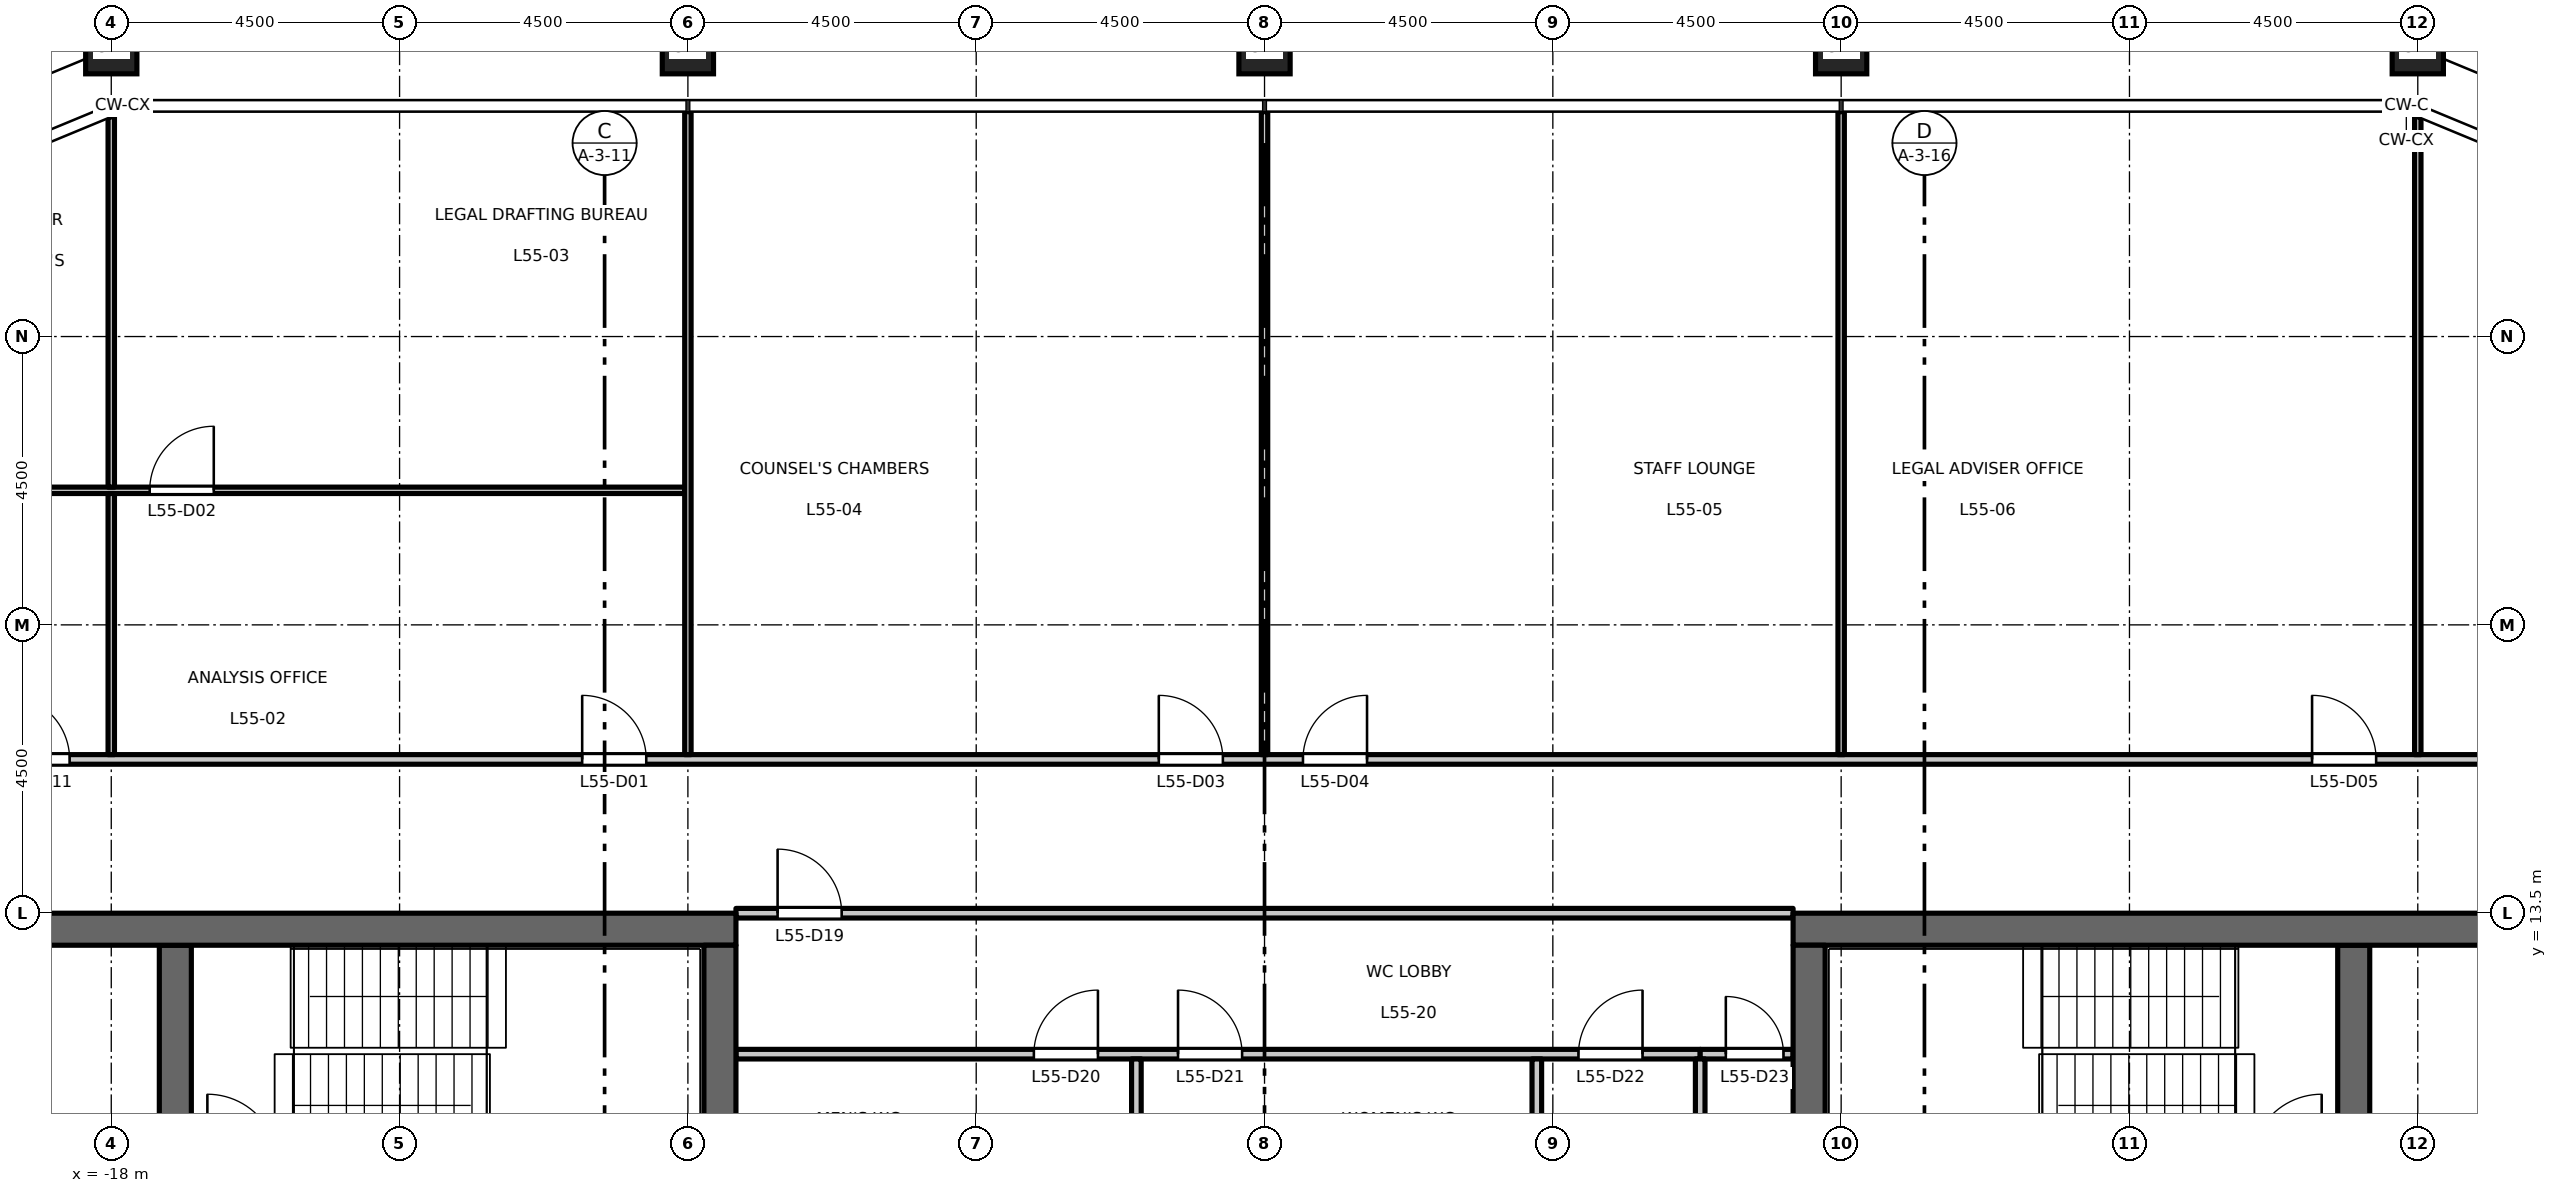
"""IFC4 building model, lengths in metres.
Left out: names, types, materials, properties, quantities, classifications, styles, units other than length and angle.
Written with IfcOpenShell. Run it as: python <this file> out.ifc"""

import sys

from ifc_helpers import new_model, si_unit, direction, frame, frame_2d, origin, origin_2d, place, context, subcontext, project, spatial, rectangle, hollow_rectangle, extrude, element, fill, save


model = new_model("IFC4")
c1 = context("Model", 3, precision=1e-05, world=origin(), true_north=direction((0.0, 1.0)))
c2 = subcontext(c1, "Body", "Model", "MODEL_VIEW")
j1 = project(units=[si_unit("LENGTHUNIT", "METRE"), si_unit("PLANEANGLEUNIT", "RADIAN")], contexts=[c1])
p1 = place(None, origin())
s1 = spatial("IfcSite", under=j1, at=p1, CompositionType="ELEMENT")
p2 = place(p1, origin())
s2 = spatial("IfcBuilding", under=s1, at=p2, CompositionType="ELEMENT")
p3 = place(p2, frame((0.0, 0.0, 255.7)))
s3 = spatial("IfcBuildingStorey", under=s2, at=p3, CompositionType="ELEMENT", Elevation=255.7)
for number, where, z_axis, x_axis in (
    (1, (18.0, 27.0, 0.0), (0.0, 0.0, 1.0), (1.0, 0.0, 0.0)),
    (2, (9.0, 27.0, 0.0), (0.0, 0.0, 1.0), (1.0, 0.0, 0.0)),
    (3, (0.0, 27.0, 0.0), (0.0, 0.0, 1.0), (1.0, 0.0, 0.0)),
    (4, (-9.0, 27.0, 0.0), (0.0, 0.0, 1.0), (1.0, 0.0, 0.0)),
    (5, (-18.0, 27.0, 0.0), (0.0, 0.0, 1.0), (1.0, 0.0, 0.0)),
):
    element("IfcColumn", number, at=place(p3, frame(where, z_axis=z_axis, x_axis=x_axis)), inside=s3, PredefinedType="COLUMN", context=c2, shape_type="SweptSolid", body=[
        extrude(hollow_rectangle(XDim=0.8, YDim=0.8, WallThickness=0.045, at=origin_2d()), origin(), (0.0, 0.0, 1.0), 4.5),
    ])
p4 = place(p3, frame((-17.0, 6.425, 0.0), z_axis=(0.0, 0.0, 1.0), x_axis=(0.0, 1.0, 0.0)))
e6 = element("IfcWall", 6, at=p4, inside=s3, PredefinedType="SHEAR", context=c2, shape_type="SweptSolid", body=[
    extrude(rectangle(XDim=6.575, YDim=0.5, at=frame_2d((3.288, 0.0))), origin(), (0.0, 0.0, 1.0), 4.35),
])
p5 = place(p3, frame((-8.25, 13.25, 0.0), z_axis=(0.0, 0.0, 1.0), x_axis=(-1.0, 0.0, 0.0)))
e7 = element("IfcWall", 7, at=p5, inside=s3, PredefinedType="SHEAR", context=c2, shape_type="SweptSolid", body=[
    extrude(rectangle(XDim=13.5, YDim=0.5, at=frame_2d((6.75, 0.0))), origin(), (0.0, 0.0, 1.0), 4.35),
])
p6 = place(p3, frame((-8.5, -13.0, 0.0), z_axis=(0.0, 0.0, 1.0), x_axis=(0.0, 1.0, 0.0)))
e8 = element("IfcWall", 8, at=p6, inside=s3, PredefinedType="SHEAR", context=c2, shape_type="SweptSolid", body=[
    extrude(rectangle(XDim=26.0, YDim=0.5, at=frame_2d((13.0, 0.0))), origin(), (0.0, 0.0, 1.0), 4.35),
])
p7 = place(p3, frame((17.0, 6.425, 0.0), z_axis=(0.0, 0.0, 1.0), x_axis=(0.0, 1.0, 0.0)))
e9 = element("IfcWall", 9, at=p7, inside=s3, PredefinedType="SHEAR", context=c2, shape_type="SweptSolid", body=[
    extrude(rectangle(XDim=6.575, YDim=0.5, at=frame_2d((3.288, 0.0))), origin(), (0.0, 0.0, 1.0), 4.35),
])
p8 = place(p3, frame((8.25, 13.25, 0.0), z_axis=(0.0, 0.0, 1.0), x_axis=(1.0, 0.0, 0.0)))
e10 = element("IfcWall", 10, at=p8, inside=s3, PredefinedType="SHEAR", context=c2, shape_type="SweptSolid", body=[
    extrude(rectangle(XDim=13.5, YDim=0.5, at=frame_2d((6.75, 0.0))), origin(), (0.0, 0.0, 1.0), 4.35),
])
p9 = place(p3, frame((8.5, -13.0, 0.0), z_axis=(0.0, 0.0, 1.0), x_axis=(0.0, 1.0, 0.0)))
e11 = element("IfcWall", 11, at=p9, inside=s3, PredefinedType="SHEAR", context=c2, shape_type="SweptSolid", body=[
    extrude(rectangle(XDim=26.0, YDim=0.5, at=frame_2d((13.0, 0.0))), origin(), (0.0, 0.0, 1.0), 4.35),
])
p10 = place(p3, frame((-8.25, 11.3, 0.0), z_axis=(0.0, 0.0, 1.0), x_axis=(1.0, 0.0, 0.0)))
e12 = element("IfcWall", 12, at=p10, inside=s3, PredefinedType="PARTITIONING", context=c2, shape_type="SweptSolid", body=[
    extrude(rectangle(XDim=15.05, YDim=0.15, at=frame_2d((7.525, 0.0))), origin(), (0.0, 0.0, 1.0), 4.35),
])
p11 = place(p10, frame((4.65, 0.0, 0.0)))
e13 = element("IfcOpeningElement", 13, at=p11, cuts=e12, PredefinedType="OPENING", context=c2, shape_type="SweptSolid", body=[
    extrude(rectangle(XDim=1.0, YDim=2.1, at=frame_2d((0.5, 1.05))), frame((0.0, 0.085, 0.0), z_axis=(0.0, -1.0, 0.0), x_axis=(1.0, 0.0, 0.0)), (0.0, 0.0, 1.0), 0.17),
])
p12 = place(p10, frame((6.9, 0.0, 0.0)))
e14 = element("IfcOpeningElement", 14, at=p12, cuts=e12, PredefinedType="OPENING", context=c2, shape_type="SweptSolid", body=[
    extrude(rectangle(XDim=1.0, YDim=2.1, at=frame_2d((0.5, 1.05))), frame((0.0, 0.085, 0.0), z_axis=(0.0, -1.0, 0.0), x_axis=(1.0, 0.0, 0.0)), (0.0, 0.0, 1.0), 0.17),
])
p13 = place(p10, frame((13.15, 0.0, 0.0)))
e15 = element("IfcOpeningElement", 15, at=p13, cuts=e12, PredefinedType="OPENING", context=c2, shape_type="SweptSolid", body=[
    extrude(rectangle(XDim=1.0, YDim=2.1, at=frame_2d((0.5, 1.05))), frame((0.0, 0.085, 0.0), z_axis=(0.0, -1.0, 0.0), x_axis=(1.0, 0.0, 0.0)), (0.0, 0.0, 1.0), 0.17),
])
p14 = place(p3, frame((6.8, 11.3, 0.0), z_axis=(0.0, 0.0, 1.0), x_axis=(1.0, 0.0, 0.0)))
e16 = element("IfcWall", 16, at=p14, inside=s3, PredefinedType="PARTITIONING", context=c2, shape_type="SweptSolid", body=[
    extrude(rectangle(XDim=1.45, YDim=0.15, at=frame_2d((0.725, 0.0))), origin(), (0.0, 0.0, 1.0), 4.35),
])
p15 = place(p14, frame((0.4, 0.0, 0.0)))
e17 = element("IfcOpeningElement", 17, at=p15, cuts=e16, PredefinedType="OPENING", context=c2, shape_type="SweptSolid", body=[
    extrude(rectangle(XDim=0.9, YDim=2.1, at=frame_2d((0.45, 1.05))), frame((0.0, 0.085, 0.0), z_axis=(0.0, -1.0, 0.0), x_axis=(1.0, 0.0, 0.0)), (0.0, 0.0, 1.0), 0.17),
])
p16 = place(p3, frame((-8.25, 13.5, 0.0), z_axis=(0.0, 0.0, 1.0), x_axis=(1.0, 0.0, 0.0)))
e18 = element("IfcWall", 18, at=p16, inside=s3, PredefinedType="PARTITIONING", context=c2, shape_type="SweptSolid", body=[
    extrude(rectangle(XDim=16.5, YDim=0.15, at=frame_2d((8.25, 0.0))), origin(), (0.0, 0.0, 1.0), 4.35),
])
p17 = place(p16, frame((0.65, 0.0, 0.0)))
e19 = element("IfcOpeningElement", 19, at=p17, cuts=e18, PredefinedType="OPENING", context=c2, shape_type="SweptSolid", body=[
    extrude(rectangle(XDim=1.0, YDim=2.1, at=frame_2d((0.5, 1.05))), frame((0.0, 0.085, 0.0), z_axis=(0.0, -1.0, 0.0), x_axis=(1.0, 0.0, 0.0)), (0.0, 0.0, 1.0), 0.17),
])
p18 = place(p3, frame((-26.01, 15.9, 0.0), z_axis=(0.0, 0.0, 1.0), x_axis=(1.0, 0.0, 0.0)))
e20 = element("IfcWall", 20, at=p18, inside=s3, PredefinedType="PARTITIONING", context=c2, shape_type="SweptSolid", body=[
    extrude(rectangle(XDim=52.02, YDim=0.15, at=frame_2d((26.01, 0.0))), origin(), (0.0, 0.0, 1.0), 4.35),
])
p19 = place(p18, frame((15.36, 0.0, 0.0)))
e21 = element("IfcOpeningElement", 21, at=p19, cuts=e20, PredefinedType="OPENING", context=c2, shape_type="SweptSolid", body=[
    extrude(rectangle(XDim=1.0, YDim=2.1, at=frame_2d((0.5, 1.05))), frame((0.0, 0.085, 0.0), z_axis=(0.0, -1.0, 0.0), x_axis=(1.0, 0.0, 0.0)), (0.0, 0.0, 1.0), 0.17),
])
p20 = place(p18, frame((24.36, 0.0, 0.0)))
e22 = element("IfcOpeningElement", 22, at=p20, cuts=e20, PredefinedType="OPENING", context=c2, shape_type="SweptSolid", body=[
    extrude(rectangle(XDim=1.0, YDim=2.1, at=frame_2d((0.5, 1.05))), frame((0.0, 0.085, 0.0), z_axis=(0.0, -1.0, 0.0), x_axis=(1.0, 0.0, 0.0)), (0.0, 0.0, 1.0), 0.17),
])
p21 = place(p18, frame((26.61, 0.0, 0.0)))
e23 = element("IfcOpeningElement", 23, at=p21, cuts=e20, PredefinedType="OPENING", context=c2, shape_type="SweptSolid", body=[
    extrude(rectangle(XDim=1.0, YDim=2.1, at=frame_2d((0.5, 1.05))), frame((0.0, 0.085, 0.0), z_axis=(0.0, -1.0, 0.0), x_axis=(1.0, 0.0, 0.0)), (0.0, 0.0, 1.0), 0.17),
])
p22 = place(p18, frame((42.36, 0.0, 0.0)))
e24 = element("IfcOpeningElement", 24, at=p22, cuts=e20, PredefinedType="OPENING", context=c2, shape_type="SweptSolid", body=[
    extrude(rectangle(XDim=1.0, YDim=2.1, at=frame_2d((0.5, 1.05))), frame((0.0, 0.085, 0.0), z_axis=(0.0, -1.0, 0.0), x_axis=(1.0, 0.0, 0.0)), (0.0, 0.0, 1.0), 0.17),
])
p23 = place(p18, frame((6.36, 0.0, 0.0)))
e25 = element("IfcOpeningElement", 25, at=p23, cuts=e20, PredefinedType="OPENING", context=c2, shape_type="SweptSolid", body=[
    extrude(rectangle(XDim=1.0, YDim=2.1, at=frame_2d((0.5, 1.05))), frame((0.0, 0.085, 0.0), z_axis=(0.0, -1.0, 0.0), x_axis=(1.0, 0.0, 0.0)), (0.0, 0.0, 1.0), 0.17),
])
p24 = place(p18, frame((50.37, 0.0, 0.0)))
e26 = element("IfcOpeningElement", 26, at=p24, cuts=e20, PredefinedType="OPENING", context=c2, shape_type="SweptSolid", body=[
    extrude(rectangle(XDim=1.0, YDim=2.1, at=frame_2d((0.5, 1.05))), frame((0.0, 0.085, 0.0), z_axis=(0.0, -1.0, 0.0), x_axis=(1.0, 0.0, 0.0)), (0.0, 0.0, 1.0), 0.17),
])
p25 = place(p3, frame((-25.058, 20.1, 0.0), z_axis=(0.0, 0.0, 1.0), x_axis=(1.0, 0.0, 0.0)))
e27 = element("IfcWall", 27, at=p25, inside=s3, PredefinedType="PARTITIONING", context=c2, shape_type="SweptSolid", body=[
    extrude(rectangle(XDim=16.008, YDim=0.1, at=frame_2d((8.004, 0.0))), origin(), (0.0, 0.0, 1.0), 4.35),
])
p26 = place(p25, frame((7.658, 0.0, 0.0)))
e28 = element("IfcOpeningElement", 28, at=p26, cuts=e27, PredefinedType="OPENING", context=c2, shape_type="SweptSolid", body=[
    extrude(rectangle(XDim=1.0, YDim=2.1, at=frame_2d((0.5, 1.05))), frame((0.0, 0.06, 0.0), z_axis=(0.0, -1.0, 0.0), x_axis=(1.0, 0.0, 0.0)), (0.0, 0.0, 1.0), 0.12),
])
p27 = place(p25, frame((0.658, 0.0, 0.0)))
e29 = element("IfcOpeningElement", 29, at=p27, cuts=e27, PredefinedType="OPENING", context=c2, shape_type="SweptSolid", body=[
    extrude(rectangle(XDim=1.0, YDim=2.1, at=frame_2d((0.5, 1.05))), frame((0.0, 0.06, 0.0), z_axis=(0.0, -1.0, 0.0), x_axis=(1.0, 0.0, 0.0)), (0.0, 0.0, 1.0), 0.12),
])
p28 = place(p3, frame((-18.0, 15.975, 0.0), z_axis=(0.0, 0.0, 1.0), x_axis=(0.0, 1.0, 0.0)))
e30 = element("IfcWall", 30, at=p28, inside=s3, PredefinedType="PARTITIONING", context=c2, shape_type="SweptSolid", body=[
    extrude(rectangle(XDim=4.075, YDim=0.1, at=frame_2d((2.038, 0.0))), origin(), (0.0, 0.0, 1.0), 3.65),
])
p29 = place(p3, frame((-18.0, 20.15, 0.0), z_axis=(0.0, 0.0, 1.0), x_axis=(0.0, 1.0, 0.0)))
e31 = element("IfcWall", 31, at=p29, inside=s3, PredefinedType="PARTITIONING", context=c2, shape_type="SweptSolid", body=[
    extrude(rectangle(XDim=5.778, YDim=0.1, at=frame_2d((2.889, 0.0))), origin(), (0.0, 0.0, 1.0), 3.65),
])
p30 = place(p3, frame((-9.0, 15.975, 0.0), z_axis=(0.0, 0.0, 1.0), x_axis=(0.0, 1.0, 0.0)))
e32 = element("IfcWall", 32, at=p30, inside=s3, PredefinedType="PARTITIONING", context=c2, shape_type="SweptSolid", body=[
    extrude(rectangle(XDim=10.035, YDim=0.1, at=frame_2d((5.018, 0.0))), origin(), (0.0, 0.0, 1.0), 3.65),
])
p31 = place(p3, frame((-2.0, 8.37, 0.0), z_axis=(0.0, 0.0, 1.0), x_axis=(0.0, 1.0, 0.0)))
e33 = element("IfcWall", 33, at=p31, inside=s3, PredefinedType="PARTITIONING", context=c2, shape_type="SweptSolid", body=[
    extrude(rectangle(XDim=2.855, YDim=0.15, at=frame_2d((1.427, 0.0))), origin(), (0.0, 0.0, 1.0), 4.35),
])
p32 = place(p3, frame((0.0, 15.975, 0.0), z_axis=(0.0, 0.0, 1.0), x_axis=(0.0, 1.0, 0.0)))
e34 = element("IfcWall", 34, at=p32, inside=s3, PredefinedType="PARTITIONING", context=c2, shape_type="SweptSolid", body=[
    extrude(rectangle(XDim=10.035, YDim=0.1, at=frame_2d((5.018, 0.0))), origin(), (0.0, 0.0, 1.0), 3.55),
])
p33 = place(p3, frame((4.25, 8.37, 0.0), z_axis=(0.0, 0.0, 1.0), x_axis=(0.0, 1.0, 0.0)))
e35 = element("IfcWall", 35, at=p33, inside=s3, PredefinedType="PARTITIONING", context=c2, shape_type="SweptSolid", body=[
    extrude(rectangle(XDim=2.855, YDim=0.15, at=frame_2d((1.427, 0.0))), origin(), (0.0, 0.0, 1.0), 4.35),
])
p34 = place(p3, frame((6.8, 8.069, 0.0), z_axis=(0.0, 0.0, 1.0), x_axis=(0.0, 1.0, 0.0)))
e36 = element("IfcWall", 36, at=p34, inside=s3, PredefinedType="PARTITIONING", context=c2, shape_type="SweptSolid", body=[
    extrude(rectangle(XDim=3.156, YDim=0.15, at=frame_2d((1.578, 0.0))), origin(), (0.0, 0.0, 1.0), 4.35),
])
p35 = place(p3, frame((9.0, 15.975, 0.0), z_axis=(0.0, 0.0, 1.0), x_axis=(0.0, 1.0, 0.0)))
e37 = element("IfcWall", 37, at=p35, inside=s3, PredefinedType="PARTITIONING", context=c2, shape_type="SweptSolid", body=[
    extrude(rectangle(XDim=10.035, YDim=0.1, at=frame_2d((5.018, 0.0))), origin(), (0.0, 0.0, 1.0), 3.65),
])
p36 = place(p3, frame((18.0, 15.975, 0.0), z_axis=(0.0, 0.0, 1.0), x_axis=(0.0, 1.0, 0.0)))
e38 = element("IfcWall", 38, at=p36, inside=s3, PredefinedType="PARTITIONING", context=c2, shape_type="SweptSolid", body=[
    extrude(rectangle(XDim=9.953, YDim=0.1, at=frame_2d((4.977, 0.0))), origin(), (0.0, 0.0, 1.0), 3.65),
])
p37 = place(p19, origin())
e39 = element("IfcDoor", 39, at=p37, inside=s3, OperationType="SINGLE_SWING_LEFT", PredefinedType="DOOR", context=c2, shape_type="SweptSolid", body=[
    extrude(rectangle(XDim=1.0, YDim=2.1, at=frame_2d((0.5, 1.05))), frame((0.0, 0.025, 0.0), z_axis=(0.0, -1.0, 0.0), x_axis=(1.0, 0.0, 0.0)), (0.0, 0.0, 1.0), 0.05),
])
fill(e21, e39)
p38 = place(p26, origin())
e40 = element("IfcDoor", 40, at=p38, inside=s3, OperationType="SINGLE_SWING_RIGHT", PredefinedType="DOOR", context=c2, shape_type="SweptSolid", body=[
    extrude(rectangle(XDim=1.0, YDim=2.1, at=frame_2d((0.5, 1.05))), frame((0.0, 0.025, 0.0), z_axis=(0.0, -1.0, 0.0), x_axis=(1.0, 0.0, 0.0)), (0.0, 0.0, 1.0), 0.05),
])
fill(e28, e40)
p39 = place(p20, origin())
e41 = element("IfcDoor", 41, at=p39, inside=s3, OperationType="SINGLE_SWING_LEFT", PredefinedType="DOOR", context=c2, shape_type="SweptSolid", body=[
    extrude(rectangle(XDim=1.0, YDim=2.1, at=frame_2d((0.5, 1.05))), frame((0.0, 0.025, 0.0), z_axis=(0.0, -1.0, 0.0), x_axis=(1.0, 0.0, 0.0)), (0.0, 0.0, 1.0), 0.05),
])
fill(e22, e41)
p40 = place(p21, origin())
e42 = element("IfcDoor", 42, at=p40, inside=s3, OperationType="SINGLE_SWING_RIGHT", PredefinedType="DOOR", context=c2, shape_type="SweptSolid", body=[
    extrude(rectangle(XDim=1.0, YDim=2.1, at=frame_2d((0.5, 1.05))), frame((0.0, 0.025, 0.0), z_axis=(0.0, -1.0, 0.0), x_axis=(1.0, 0.0, 0.0)), (0.0, 0.0, 1.0), 0.05),
])
fill(e23, e42)
p41 = place(p22, origin())
e43 = element("IfcDoor", 43, at=p41, inside=s3, OperationType="SINGLE_SWING_LEFT", PredefinedType="DOOR", context=c2, shape_type="SweptSolid", body=[
    extrude(rectangle(XDim=1.0, YDim=2.1, at=frame_2d((0.5, 1.05))), frame((0.0, 0.025, 0.0), z_axis=(0.0, -1.0, 0.0), x_axis=(1.0, 0.0, 0.0)), (0.0, 0.0, 1.0), 0.05),
])
fill(e24, e43)
p42 = place(p23, origin())
e44 = element("IfcDoor", 44, at=p42, inside=s3, OperationType="SINGLE_SWING_LEFT", PredefinedType="DOOR", context=c2, shape_type="SweptSolid", body=[
    extrude(rectangle(XDim=1.0, YDim=2.1, at=frame_2d((0.5, 1.05))), frame((0.0, 0.025, 0.0), z_axis=(0.0, -1.0, 0.0), x_axis=(1.0, 0.0, 0.0)), (0.0, 0.0, 1.0), 0.05),
])
fill(e25, e44)
p43 = place(p17, origin())
e45 = element("IfcDoor", 45, at=p43, inside=s3, OperationType="SINGLE_SWING_LEFT", PredefinedType="DOOR", context=c2, shape_type="SweptSolid", body=[
    extrude(rectangle(XDim=1.0, YDim=2.1, at=frame_2d((0.5, 1.05))), frame((0.0, 0.025, 0.0), z_axis=(0.0, -1.0, 0.0), x_axis=(1.0, 0.0, 0.0)), (0.0, 0.0, 1.0), 0.05),
])
fill(e19, e45)
p44 = place(p11, origin())
e46 = element("IfcDoor", 46, at=p44, inside=s3, OperationType="SINGLE_SWING_RIGHT", PredefinedType="DOOR", context=c2, shape_type="SweptSolid", body=[
    extrude(rectangle(XDim=1.0, YDim=2.1, at=frame_2d((0.5, 1.05))), frame((0.0, 0.025, 0.0), z_axis=(0.0, -1.0, 0.0), x_axis=(1.0, 0.0, 0.0)), (0.0, 0.0, 1.0), 0.05),
])
fill(e13, e46)
p45 = place(p12, origin())
e47 = element("IfcDoor", 47, at=p45, inside=s3, OperationType="SINGLE_SWING_LEFT", PredefinedType="DOOR", context=c2, shape_type="SweptSolid", body=[
    extrude(rectangle(XDim=1.0, YDim=2.1, at=frame_2d((0.5, 1.05))), frame((0.0, 0.025, 0.0), z_axis=(0.0, -1.0, 0.0), x_axis=(1.0, 0.0, 0.0)), (0.0, 0.0, 1.0), 0.05),
])
fill(e14, e47)
p46 = place(p13, origin())
e48 = element("IfcDoor", 48, at=p46, inside=s3, OperationType="SINGLE_SWING_RIGHT", PredefinedType="DOOR", context=c2, shape_type="SweptSolid", body=[
    extrude(rectangle(XDim=1.0, YDim=2.1, at=frame_2d((0.5, 1.05))), frame((0.0, 0.025, 0.0), z_axis=(0.0, -1.0, 0.0), x_axis=(1.0, 0.0, 0.0)), (0.0, 0.0, 1.0), 0.05),
])
fill(e15, e48)
p47 = place(p15, origin())
e49 = element("IfcDoor", 49, at=p47, inside=s3, OperationType="SINGLE_SWING_LEFT", PredefinedType="DOOR", context=c2, shape_type="SweptSolid", body=[
    extrude(rectangle(XDim=0.9, YDim=2.1, at=frame_2d((0.45, 1.05))), frame((0.0, 0.025, 0.0), z_axis=(0.0, -1.0, 0.0), x_axis=(1.0, 0.0, 0.0)), (0.0, 0.0, 1.0), 0.05),
])
fill(e17, e49)
save(model, sys.argv[1])
